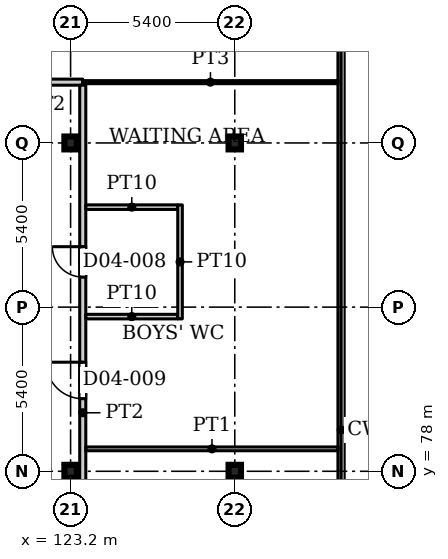
"""IFC4 building model, lengths in metres.
Left out: names, types, materials, properties, quantities, classifications, styles, units other than length and angle.
Written with IfcOpenShell. Run it as: python <this file> out.ifc"""

import sys

from ifc_helpers import new_model, si_unit, direction, frame, frame_2d, origin, origin_2d, place, context, subcontext, project, spatial, rectangle, i_section, extrude, source, transform, mapped, element, fill, save


model = new_model("IFC4")
c1 = context("Model", 3, precision=1e-05, world=origin(), true_north=direction((0.0, 1.0)))
c2 = subcontext(c1, "Body", "Model", "MODEL_VIEW")
j1 = project(units=[si_unit("LENGTHUNIT", "METRE"), si_unit("PLANEANGLEUNIT", "RADIAN")], contexts=[c1])
p1 = place(None, origin())
s1 = spatial("IfcSite", under=j1, at=p1, CompositionType="ELEMENT")
p2 = place(p1, origin())
s2 = spatial("IfcBuilding", under=s1, at=p2, CompositionType="ELEMENT")
p3 = place(p2, frame((0.0, 0.0, 21.5)))
s3 = spatial("IfcBuildingStorey", under=s2, at=p3, CompositionType="ELEMENT", Elevation=21.5)
for number, where, z_axis, x_axis in (
    (1, (123.2, 78.0, 0.0), (0.0, 0.0, 1.0), (1.0, 0.0, 0.0)),
    (2, (128.6, 78.0, 0.0), (0.0, 0.0, 1.0), (1.0, 0.0, 0.0)),
    (3, (123.2, 88.8, 0.0), (0.0, 0.0, 1.0), (1.0, 0.0, 0.0)),
    (4, (128.6, 88.8, 0.0), (0.0, 0.0, 1.0), (1.0, 0.0, 0.0)),
):
    element("IfcColumn", number, at=place(p3, frame(where, z_axis=z_axis, x_axis=x_axis)), inside=s3, PredefinedType="COLUMN", context=c2, shape_type="SweptSolid", body=[
        extrude(i_section(OverallWidth=0.409, OverallDepth=0.425, WebThickness=0.033, FlangeThickness=0.052, FilletRadius=0.013, at=origin_2d()), origin(), (0.0, 0.0, 1.0), 4.5),
    ])
p4 = place(p3, frame((121.2, 90.8, 0.0), z_axis=(0.0, 0.0, 1.0), x_axis=(1.0, 0.0, 0.0)))
e5 = element("IfcWall", 5, at=p4, inside=s3, PredefinedType="PARTITIONING", context=c2, shape_type="SweptSolid", body=[
    extrude(rectangle(XDim=2.4, YDim=0.2, at=frame_2d((1.2, 0.0))), origin(), (0.0, 0.0, 1.0), 4.18),
])
p5 = place(p3, frame((123.6, 69.15, 0.0), z_axis=(0.0, 0.0, 1.0), x_axis=(0.0, 1.0, 0.0)))
e6 = element("IfcWall", 6, at=p5, inside=s3, PredefinedType="PARTITIONING", context=c2, shape_type="SweptSolid", body=[
    extrude(rectangle(XDim=21.55, YDim=0.2, at=frame_2d((10.775, 0.0))), origin(), (0.0, 0.0, 1.0), 4.18),
])
p6 = place(p5, frame((4.4, 0.0, 0.0)))
e7 = element("IfcOpeningElement", 7, at=p6, cuts=e6, PredefinedType="OPENING", context=c2, shape_type="SweptSolid", body=[
    extrude(rectangle(XDim=1.0, YDim=2.1, at=frame_2d((0.5, 1.05))), frame((0.0, 0.11, 0.0), z_axis=(0.0, -1.0, 0.0), x_axis=(1.0, 0.0, 0.0)), (0.0, 0.0, 1.0), 0.22),
])
p7 = place(p5, frame((15.238, 0.0, 0.0)))
e8 = element("IfcOpeningElement", 8, at=p7, cuts=e6, PredefinedType="OPENING", context=c2, shape_type="SweptSolid", body=[
    extrude(rectangle(XDim=1.0, YDim=2.1, at=frame_2d((0.5, 1.05))), frame((0.0, 0.11, 0.0), z_axis=(0.0, -1.0, 0.0), x_axis=(1.0, 0.0, 0.0)), (0.0, 0.0, 1.0), 0.22),
])
p8 = place(p5, frame((11.238, 0.0, 0.0)))
e9 = element("IfcOpeningElement", 9, at=p8, cuts=e6, PredefinedType="OPENING", context=c2, shape_type="SweptSolid", body=[
    extrude(rectangle(XDim=1.2, YDim=2.1, at=frame_2d((0.6, 1.05))), frame((0.0, 0.11, 0.0), z_axis=(0.0, -1.0, 0.0), x_axis=(1.0, 0.0, 0.0)), (0.0, 0.0, 1.0), 0.22),
])
p9 = place(p3, frame((123.6, 90.8, 0.0), z_axis=(0.0, 0.0, 1.0), x_axis=(1.0, 0.0, 0.0)))
e10 = element("IfcWall", 10, at=p9, inside=s3, PredefinedType="PARTITIONING", context=c2, shape_type="SweptSolid", body=[
    extrude(rectangle(XDim=8.4, YDim=0.1, at=frame_2d((4.2, 0.0))), origin(), (0.0, 0.0, 1.0), 4.18),
])
p10 = place(p3, frame((123.7, 78.738, 0.0), z_axis=(0.0, 0.0, 1.0), x_axis=(1.0, 0.0, 0.0)))
e11 = element("IfcWall", 11, at=p10, inside=s3, PredefinedType="PARTITIONING", context=c2, shape_type="SweptSolid", body=[
    extrude(rectangle(XDim=8.3, YDim=0.125, at=frame_2d((4.15, 0.0))), origin(), (0.0, 0.0, 1.0), 4.18),
])
for number, where, z_axis, x_axis in (
    (12, (123.7, 83.088, 0.0), (0.0, 0.0, 1.0), (1.0, 0.0, 0.0)),
    (13, (123.7, 86.688, 0.0), (0.0, 0.0, 1.0), (1.0, 0.0, 0.0)),
):
    element("IfcWall", number, at=place(p3, frame(where, z_axis=z_axis, x_axis=x_axis)), inside=s3, PredefinedType="PARTITIONING", context=c2, shape_type="SweptSolid", body=[
        extrude(rectangle(XDim=3.025, YDim=0.15, at=frame_2d((1.513, 0.0))), origin(), (0.0, 0.0, 1.0), 4.18),
    ])
p11 = place(p3, frame((126.8, 83.013, 0.0), z_axis=(0.0, 0.0, 1.0), x_axis=(0.0, 1.0, 0.0)))
e14 = element("IfcWall", 14, at=p11, inside=s3, PredefinedType="PARTITIONING", context=c2, shape_type="SweptSolid", body=[
    extrude(rectangle(XDim=3.75, YDim=0.15, at=frame_2d((1.875, 0.0))), origin(), (0.0, 0.0, 1.0), 4.18),
])
m1 = source(origin(), c2, "Body", "SweptSolid", [
    extrude(rectangle(XDim=1.0, YDim=2.1, at=frame_2d((0.5, 1.05))), frame((0.0, 0.025, 0.0), z_axis=(0.0, -1.0, 0.0), x_axis=(1.0, 0.0, 0.0)), (0.0, 0.0, 1.0), 0.05),
])
p12 = place(p7, origin())
e15 = element("IfcDoor", 15, at=p12, inside=s3, OperationType="SINGLE_SWING_LEFT", PredefinedType="DOOR", context=c2, shape_type="MappedRepresentation", body=[
    mapped(m1, transform((0.0, 0.0, 0.0), x_axis=(1.0, 0.0, 0.0), y_axis=(0.0, 1.0, 0.0), z_axis=(0.0, 0.0, 1.0), scale=1.0)),
])
fill(e8, e15)
m2 = source(origin(), c2, "Body", "SweptSolid", [
    extrude(rectangle(XDim=1.2, YDim=2.1, at=frame_2d((0.6, 1.05))), frame((0.0, 0.025, 0.0), z_axis=(0.0, -1.0, 0.0), x_axis=(1.0, 0.0, 0.0)), (0.0, 0.0, 1.0), 0.05),
])
p13 = place(p8, origin())
e16 = element("IfcDoor", 16, at=p13, inside=s3, OperationType="SINGLE_SWING_LEFT", PredefinedType="DOOR", context=c2, shape_type="MappedRepresentation", body=[
    mapped(m2, transform((0.0, 0.0, 0.0), x_axis=(1.0, 0.0, 0.0), y_axis=(0.0, 1.0, 0.0), z_axis=(0.0, 0.0, 1.0), scale=1.0)),
])
fill(e9, e16)
save(model, sys.argv[1])
